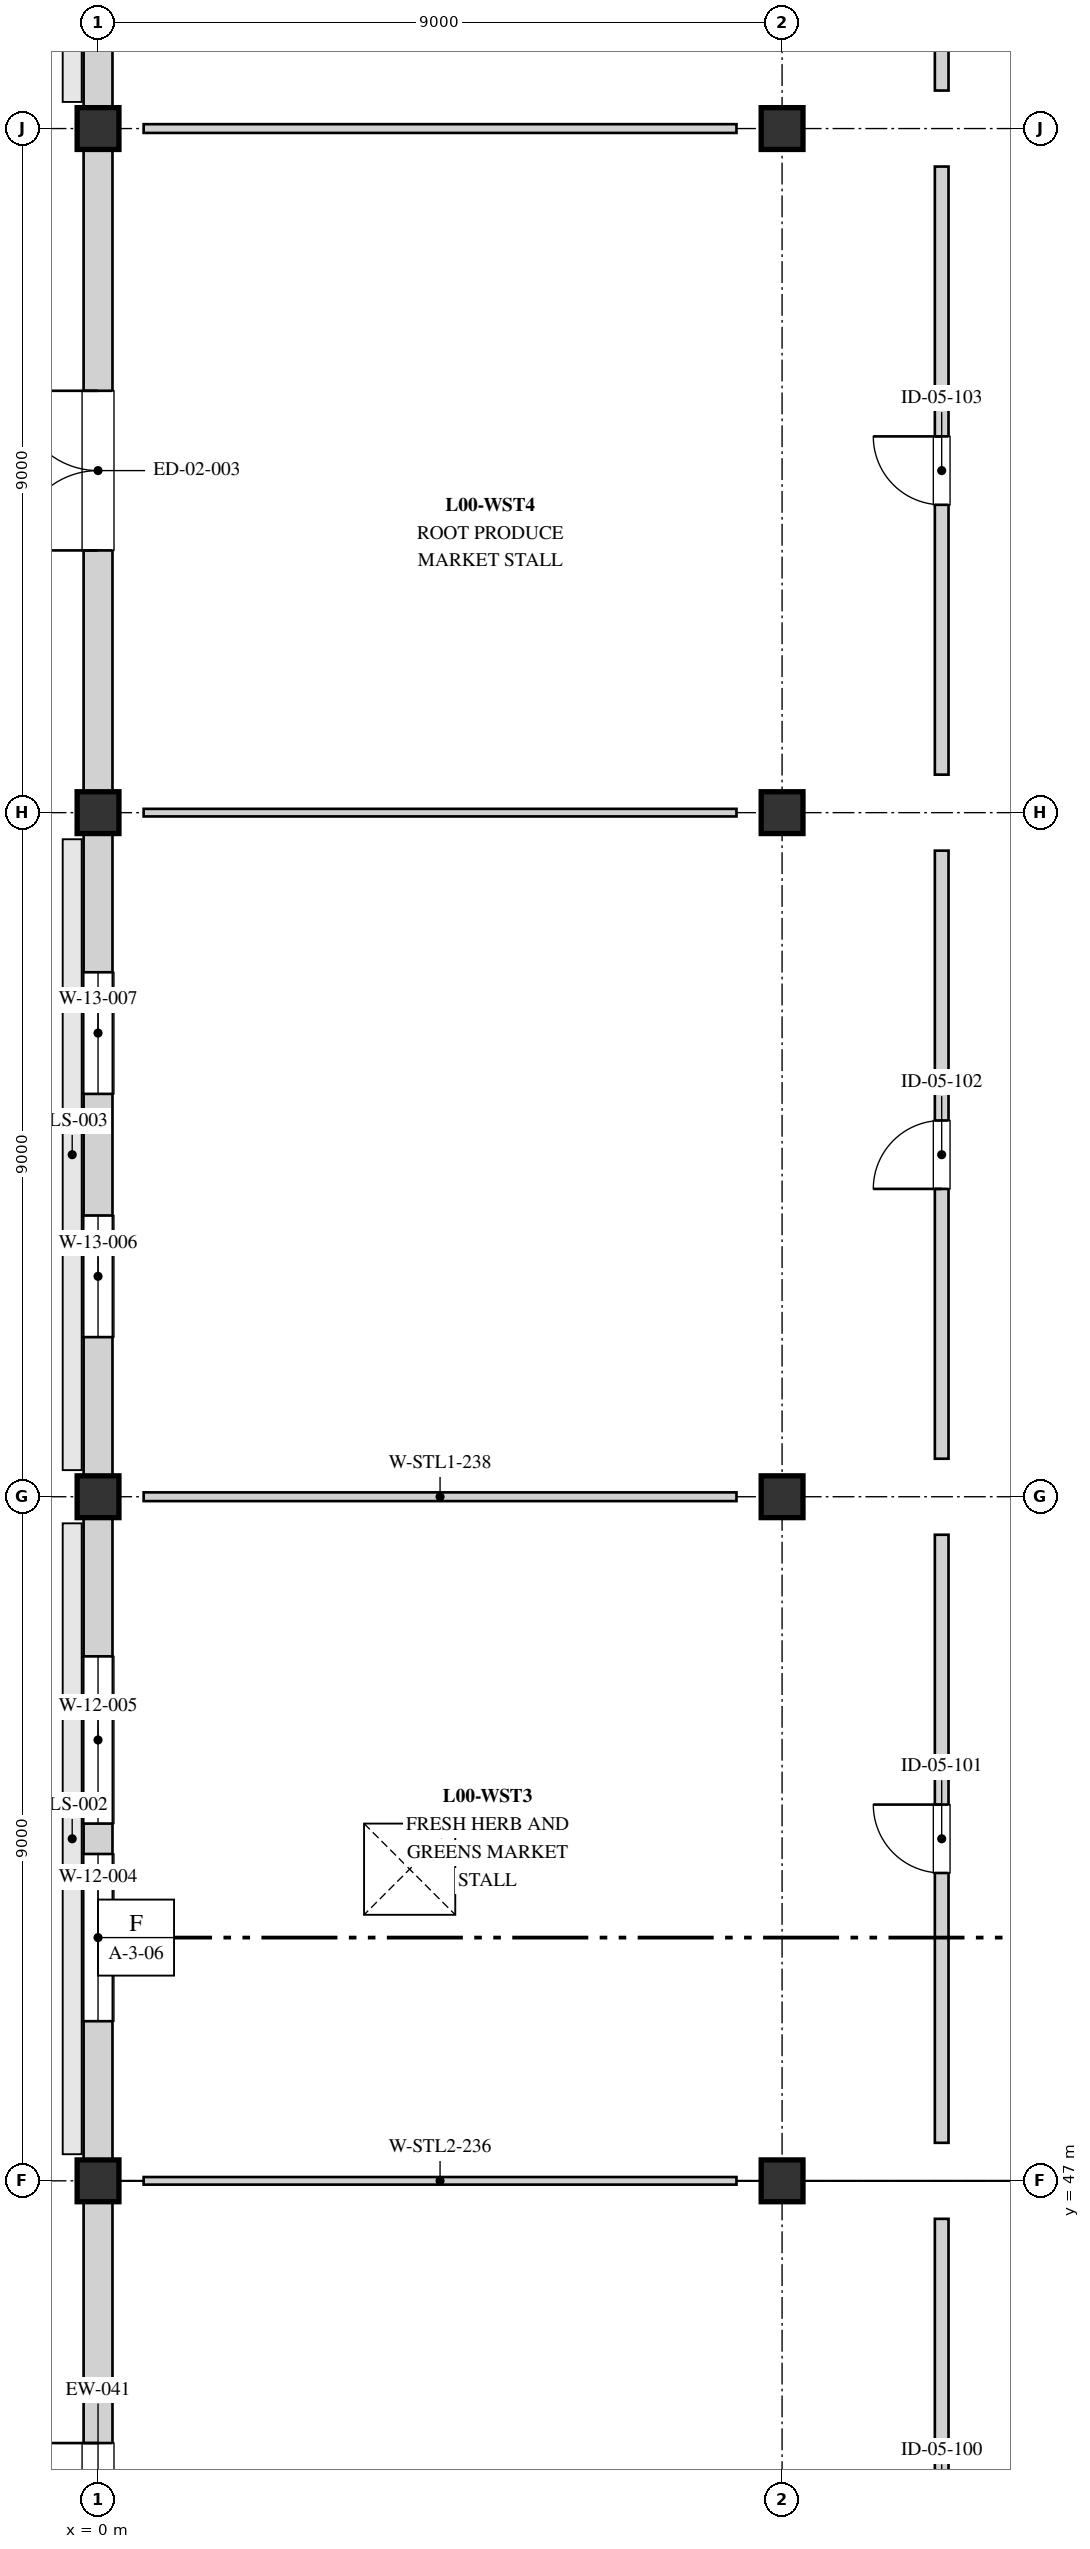
"""IFC4 building model, lengths in metres.
Left out: names, types, materials, properties, quantities, classifications, styles, units other than length and angle.
Written with IfcOpenShell. Run it as: python <this file> out.ifc"""

import sys

from ifc_helpers import new_model, si_unit, direction, frame, frame_2d, origin, origin_2d, place, context, subcontext, project, spatial, rectangle, extrude, element, fill, save


model = new_model("IFC4")
c1 = context("Model", 3, precision=1e-05, world=origin(), true_north=direction((0.0, 1.0)))
c2 = subcontext(c1, "Body", "Model", "MODEL_VIEW")
j1 = project(units=[si_unit("LENGTHUNIT", "METRE"), si_unit("PLANEANGLEUNIT", "RADIAN")], contexts=[c1])
p1 = place(None, origin())
s1 = spatial("IfcSite", under=j1, at=p1, CompositionType="ELEMENT")
p2 = place(p1, origin())
s2 = spatial("IfcBuilding", under=s1, at=p2, CompositionType="ELEMENT")
p3 = place(p2, origin())
s3 = spatial("IfcBuildingStorey", under=s2, at=p3, CompositionType="ELEMENT", Elevation=0.0)
for number, where, z_axis, x_axis in (
    (1, (0.0, 47.0, 0.0), (0.0, 0.0, 1.0), (1.0, 0.0, 0.0)),
    (2, (0.0, 56.0, 0.0), (0.0, 0.0, 1.0), (1.0, 0.0, 0.0)),
    (3, (0.0, 65.0, 0.0), (0.0, 0.0, 1.0), (1.0, 0.0, 0.0)),
    (4, (0.0, 74.0, 0.0), (0.0, 0.0, 1.0), (1.0, 0.0, 0.0)),
    (5, (9.0, 47.0, 0.0), (0.0, 0.0, 1.0), (1.0, 0.0, 0.0)),
    (6, (9.0, 56.0, 0.0), (0.0, 0.0, 1.0), (1.0, 0.0, 0.0)),
    (7, (9.0, 65.0, 0.0), (0.0, 0.0, 1.0), (1.0, 0.0, 0.0)),
    (8, (9.0, 74.0, 0.0), (0.0, 0.0, 1.0), (1.0, 0.0, 0.0)),
):
    element("IfcColumn", number, at=place(p3, frame(where, z_axis=z_axis, x_axis=x_axis)), inside=s3, PredefinedType="COLUMN", context=c2, shape_type="SweptSolid", body=[
        extrude(rectangle(XDim=0.55, YDim=0.55, at=origin_2d()), origin(), (0.0, 0.0, 1.0), 4.5),
    ])
p4 = place(p3, frame((0.0, 38.0, 0.0), z_axis=(0.0, 0.0, 1.0), x_axis=(0.0, 1.0, 0.0)))
e9 = element("IfcWall", 9, at=p4, inside=s3, PredefinedType="STANDARD", context=c2, shape_type="SweptSolid", body=[
    extrude(rectangle(XDim=9.0, YDim=0.38, at=frame_2d((4.5, 0.0))), origin(), (0.0, 0.0, 1.0), 3.35),
])
p5 = place(p4, frame((3.45, 0.0, 0.0)))
e10 = element("IfcOpeningElement", 10, at=p5, cuts=e9, PredefinedType="OPENING", context=c2, shape_type="SweptSolid", body=[
    extrude(rectangle(XDim=2.1, YDim=2.5, at=frame_2d((1.05, 1.25))), frame((0.0, 0.2, 0.0), z_axis=(0.0, -1.0, 0.0), x_axis=(1.0, 0.0, 0.0)), (0.0, 0.0, 1.0), 0.4),
])
p6 = place(p3, frame((0.0, 47.0, 0.0), z_axis=(0.0, 0.0, 1.0), x_axis=(0.0, 1.0, 0.0)))
e11 = element("IfcWall", 11, at=p6, inside=s3, PredefinedType="STANDARD", context=c2, shape_type="SweptSolid", body=[
    extrude(rectangle(XDim=9.0, YDim=0.38, at=frame_2d((4.5, 0.0))), origin(), (0.0, 0.0, 1.0), 3.35),
])
p7 = place(p6, frame((2.1, 0.0, 0.95)))
e12 = element("IfcOpeningElement", 12, at=p7, cuts=e11, PredefinedType="OPENING", context=c2, shape_type="SweptSolid", body=[
    extrude(rectangle(XDim=2.2, YDim=2.1, at=frame_2d((1.1, 1.05))), frame((0.0, 0.2, 0.0), z_axis=(0.0, -1.0, 0.0), x_axis=(1.0, 0.0, 0.0)), (0.0, 0.0, 1.0), 0.4),
])
p8 = place(p6, frame((4.7, 0.0, 0.95)))
e13 = element("IfcOpeningElement", 13, at=p8, cuts=e11, PredefinedType="OPENING", context=c2, shape_type="SweptSolid", body=[
    extrude(rectangle(XDim=2.2, YDim=2.1, at=frame_2d((1.1, 1.05))), frame((0.0, 0.2, 0.0), z_axis=(0.0, -1.0, 0.0), x_axis=(1.0, 0.0, 0.0)), (0.0, 0.0, 1.0), 0.4),
])
p9 = place(p3, frame((0.0, 56.0, 0.0), z_axis=(0.0, 0.0, 1.0), x_axis=(0.0, 1.0, 0.0)))
e14 = element("IfcWall", 14, at=p9, inside=s3, PredefinedType="STANDARD", context=c2, shape_type="SweptSolid", body=[
    extrude(rectangle(XDim=9.0, YDim=0.38, at=frame_2d((4.5, 0.0))), origin(), (0.0, 0.0, 1.0), 3.35),
])
p10 = place(p9, frame((2.1, 0.0, 0.95)))
e15 = element("IfcOpeningElement", 15, at=p10, cuts=e14, PredefinedType="OPENING", context=c2, shape_type="SweptSolid", body=[
    extrude(rectangle(XDim=1.6, YDim=2.1, at=frame_2d((0.8, 1.05))), frame((0.0, 0.2, 0.0), z_axis=(0.0, -1.0, 0.0), x_axis=(1.0, 0.0, 0.0)), (0.0, 0.0, 1.0), 0.4),
])
p11 = place(p9, frame((5.3, 0.0, 0.95)))
e16 = element("IfcOpeningElement", 16, at=p11, cuts=e14, PredefinedType="OPENING", context=c2, shape_type="SweptSolid", body=[
    extrude(rectangle(XDim=1.6, YDim=2.1, at=frame_2d((0.8, 1.05))), frame((0.0, 0.2, 0.0), z_axis=(0.0, -1.0, 0.0), x_axis=(1.0, 0.0, 0.0)), (0.0, 0.0, 1.0), 0.4),
])
p12 = place(p3, frame((0.0, 65.0, 0.0), z_axis=(0.0, 0.0, 1.0), x_axis=(0.0, 1.0, 0.0)))
e17 = element("IfcWall", 17, at=p12, inside=s3, PredefinedType="STANDARD", context=c2, shape_type="SweptSolid", body=[
    extrude(rectangle(XDim=9.0, YDim=0.38, at=frame_2d((4.5, 0.0))), origin(), (0.0, 0.0, 1.0), 3.35),
])
p13 = place(p12, frame((3.45, 0.0, 0.0)))
e18 = element("IfcOpeningElement", 18, at=p13, cuts=e17, PredefinedType="OPENING", context=c2, shape_type="SweptSolid", body=[
    extrude(rectangle(XDim=2.1, YDim=2.5, at=frame_2d((1.05, 1.25))), frame((0.0, 0.2, 0.0), z_axis=(0.0, -1.0, 0.0), x_axis=(1.0, 0.0, 0.0)), (0.0, 0.0, 1.0), 0.4),
])
p14 = place(p3, frame((0.0, 74.0, 0.0), z_axis=(0.0, 0.0, 1.0), x_axis=(0.0, 1.0, 0.0)))
e19 = element("IfcWall", 19, at=p14, inside=s3, PredefinedType="STANDARD", context=c2, shape_type="SweptSolid", body=[
    extrude(rectangle(XDim=9.0, YDim=0.38, at=frame_2d((4.5, 0.0))), origin(), (0.0, 0.0, 1.0), 3.35),
])
p15 = place(p14, frame((2.1, 0.0, 0.95)))
e20 = element("IfcOpeningElement", 20, at=p15, cuts=e19, PredefinedType="OPENING", context=c2, shape_type="SweptSolid", body=[
    extrude(rectangle(XDim=2.2, YDim=2.1, at=frame_2d((1.1, 1.05))), frame((0.0, 0.2, 0.0), z_axis=(0.0, -1.0, 0.0), x_axis=(1.0, 0.0, 0.0)), (0.0, 0.0, 1.0), 0.4),
])
p16 = place(p14, frame((4.7, 0.0, 0.95)))
e21 = element("IfcOpeningElement", 21, at=p16, cuts=e19, PredefinedType="OPENING", context=c2, shape_type="SweptSolid", body=[
    extrude(rectangle(XDim=2.2, YDim=2.1, at=frame_2d((1.1, 1.05))), frame((0.0, 0.2, 0.0), z_axis=(0.0, -1.0, 0.0), x_axis=(1.0, 0.0, 0.0)), (0.0, 0.0, 1.0), 0.4),
])
p17 = place(p3, frame((11.1, 38.5, 0.0), z_axis=(0.0, 0.0, 1.0), x_axis=(0.0, 1.0, 0.0)))
e22 = element("IfcWall", 22, at=p17, inside=s3, PredefinedType="STANDARD", context=c2, shape_type="SweptSolid", body=[
    extrude(rectangle(XDim=8.0, YDim=0.18, at=frame_2d((4.0, 0.0))), origin(), (0.0, 0.0, 1.0), 3.2),
])
p18 = place(p17, frame((3.55, 0.0, 0.0)))
e23 = element("IfcOpeningElement", 23, at=p18, cuts=e22, PredefinedType="OPENING", context=c2, shape_type="SweptSolid", body=[
    extrude(rectangle(XDim=0.9, YDim=2.05, at=frame_2d((0.45, 1.025))), frame((0.0, 0.1, 0.0), z_axis=(0.0, -1.0, 0.0), x_axis=(1.0, 0.0, 0.0)), (0.0, 0.0, 1.0), 0.2),
])
p19 = place(p3, frame((11.1, 47.5, 0.0), z_axis=(0.0, 0.0, 1.0), x_axis=(0.0, 1.0, 0.0)))
e24 = element("IfcWall", 24, at=p19, inside=s3, PredefinedType="STANDARD", context=c2, shape_type="SweptSolid", body=[
    extrude(rectangle(XDim=8.0, YDim=0.18, at=frame_2d((4.0, 0.0))), origin(), (0.0, 0.0, 1.0), 3.2),
])
p20 = place(p19, frame((3.55, 0.0, 0.0)))
e25 = element("IfcOpeningElement", 25, at=p20, cuts=e24, PredefinedType="OPENING", context=c2, shape_type="SweptSolid", body=[
    extrude(rectangle(XDim=0.9, YDim=2.05, at=frame_2d((0.45, 1.025))), frame((0.0, 0.1, 0.0), z_axis=(0.0, -1.0, 0.0), x_axis=(1.0, 0.0, 0.0)), (0.0, 0.0, 1.0), 0.2),
])
p21 = place(p3, frame((11.1, 56.5, 0.0), z_axis=(0.0, 0.0, 1.0), x_axis=(0.0, 1.0, 0.0)))
e26 = element("IfcWall", 26, at=p21, inside=s3, PredefinedType="STANDARD", context=c2, shape_type="SweptSolid", body=[
    extrude(rectangle(XDim=8.0, YDim=0.18, at=frame_2d((4.0, 0.0))), origin(), (0.0, 0.0, 1.0), 3.2),
])
p22 = place(p21, frame((3.55, 0.0, 0.0)))
e27 = element("IfcOpeningElement", 27, at=p22, cuts=e26, PredefinedType="OPENING", context=c2, shape_type="SweptSolid", body=[
    extrude(rectangle(XDim=0.9, YDim=2.05, at=frame_2d((0.45, 1.025))), frame((0.0, 0.1, 0.0), z_axis=(0.0, -1.0, 0.0), x_axis=(1.0, 0.0, 0.0)), (0.0, 0.0, 1.0), 0.2),
])
p23 = place(p3, frame((11.1, 65.5, 0.0), z_axis=(0.0, 0.0, 1.0), x_axis=(0.0, 1.0, 0.0)))
e28 = element("IfcWall", 28, at=p23, inside=s3, PredefinedType="STANDARD", context=c2, shape_type="SweptSolid", body=[
    extrude(rectangle(XDim=8.0, YDim=0.18, at=frame_2d((4.0, 0.0))), origin(), (0.0, 0.0, 1.0), 3.2),
])
p24 = place(p23, frame((3.55, 0.0, 0.0)))
e29 = element("IfcOpeningElement", 29, at=p24, cuts=e28, PredefinedType="OPENING", context=c2, shape_type="SweptSolid", body=[
    extrude(rectangle(XDim=0.9, YDim=2.05, at=frame_2d((0.45, 1.025))), frame((0.0, 0.1, 0.0), z_axis=(0.0, -1.0, 0.0), x_axis=(1.0, 0.0, 0.0)), (0.0, 0.0, 1.0), 0.2),
])
p25 = place(p3, frame((11.1, 74.5, 0.0), z_axis=(0.0, 0.0, 1.0), x_axis=(0.0, 1.0, 0.0)))
e30 = element("IfcWall", 30, at=p25, inside=s3, PredefinedType="STANDARD", context=c2, shape_type="SweptSolid", body=[
    extrude(rectangle(XDim=8.0, YDim=0.18, at=frame_2d((4.0, 0.0))), origin(), (0.0, 0.0, 1.0), 3.2),
])
p26 = place(p25, frame((3.55, 0.0, 0.0)))
e31 = element("IfcOpeningElement", 31, at=p26, cuts=e30, PredefinedType="OPENING", context=c2, shape_type="SweptSolid", body=[
    extrude(rectangle(XDim=0.9, YDim=2.05, at=frame_2d((0.45, 1.025))), frame((0.0, 0.1, 0.0), z_axis=(0.0, -1.0, 0.0), x_axis=(1.0, 0.0, 0.0)), (0.0, 0.0, 1.0), 0.2),
])
p27 = place(p3, frame((0.6, 47.0, 0.0), z_axis=(0.0, 0.0, 1.0), x_axis=(1.0, 0.0, 0.0)))
e32 = element("IfcWall", 32, at=p27, inside=s3, PredefinedType="PARTITIONING", context=c2, shape_type="SweptSolid", body=[
    extrude(rectangle(XDim=7.8, YDim=0.1, at=frame_2d((3.9, 0.0))), origin(), (0.0, 0.0, 1.0), 2.4),
])
p28 = place(p3, frame((0.6, 56.0, 0.0), z_axis=(0.0, 0.0, 1.0), x_axis=(1.0, 0.0, 0.0)))
e33 = element("IfcWall", 33, at=p28, inside=s3, PredefinedType="PARTITIONING", context=c2, shape_type="SweptSolid", body=[
    extrude(rectangle(XDim=7.8, YDim=0.115, at=frame_2d((3.9, 0.0))), origin(), (0.0, 0.0, 1.0), 2.4),
])
p29 = place(p3, frame((0.6, 65.0, 0.0), z_axis=(0.0, 0.0, 1.0), x_axis=(1.0, 0.0, 0.0)))
e34 = element("IfcWall", 34, at=p29, inside=s3, PredefinedType="PARTITIONING", context=c2, shape_type="SweptSolid", body=[
    extrude(rectangle(XDim=7.8, YDim=0.1, at=frame_2d((3.9, 0.0))), origin(), (0.0, 0.0, 1.0), 2.4),
])
p30 = place(p3, frame((0.6, 74.0, 0.0), z_axis=(0.0, 0.0, 1.0), x_axis=(1.0, 0.0, 0.0)))
e35 = element("IfcWall", 35, at=p30, inside=s3, PredefinedType="PARTITIONING", context=c2, shape_type="SweptSolid", body=[
    extrude(rectangle(XDim=7.8, YDim=0.115, at=frame_2d((3.9, 0.0))), origin(), (0.0, 0.0, 1.0), 2.4),
])
p31 = place(p5, origin())
e36 = element("IfcDoor", 36, at=p31, inside=s3, OperationType="DOUBLE_DOOR_SINGLE_SWING", PredefinedType="DOOR", context=c2, shape_type="SweptSolid", body=[
    extrude(rectangle(XDim=2.1, YDim=2.5, at=frame_2d((1.05, 1.25))), frame((0.0, 0.025, 0.0), z_axis=(0.0, -1.0, 0.0), x_axis=(1.0, 0.0, 0.0)), (0.0, 0.0, 1.0), 0.05),
])
fill(e10, e36)
p32 = place(p7, origin())
e37 = element("IfcWindow", 37, at=p32, inside=s3, PartitioningType="SINGLE_PANEL", PredefinedType="WINDOW", context=c2, shape_type="SweptSolid", body=[
    extrude(rectangle(XDim=2.2, YDim=2.1, at=frame_2d((1.1, 1.05))), frame((0.0, 0.03, 0.0), z_axis=(0.0, -1.0, 0.0), x_axis=(1.0, 0.0, 0.0)), (0.0, 0.0, 1.0), 0.06),
])
fill(e12, e37)
p33 = place(p8, origin())
e38 = element("IfcWindow", 38, at=p33, inside=s3, PartitioningType="SINGLE_PANEL", PredefinedType="WINDOW", context=c2, shape_type="SweptSolid", body=[
    extrude(rectangle(XDim=2.2, YDim=2.1, at=frame_2d((1.1, 1.05))), frame((0.0, 0.03, 0.0), z_axis=(0.0, -1.0, 0.0), x_axis=(1.0, 0.0, 0.0)), (0.0, 0.0, 1.0), 0.06),
])
fill(e13, e38)
p34 = place(p10, origin())
e39 = element("IfcWindow", 39, at=p34, inside=s3, PartitioningType="SINGLE_PANEL", PredefinedType="WINDOW", context=c2, shape_type="SweptSolid", body=[
    extrude(rectangle(XDim=1.6, YDim=2.1, at=frame_2d((0.8, 1.05))), frame((0.0, 0.03, 0.0), z_axis=(0.0, -1.0, 0.0), x_axis=(1.0, 0.0, 0.0)), (0.0, 0.0, 1.0), 0.06),
])
fill(e15, e39)
p35 = place(p11, origin())
e40 = element("IfcWindow", 40, at=p35, inside=s3, PartitioningType="SINGLE_PANEL", PredefinedType="WINDOW", context=c2, shape_type="SweptSolid", body=[
    extrude(rectangle(XDim=1.6, YDim=2.1, at=frame_2d((0.8, 1.05))), frame((0.0, 0.03, 0.0), z_axis=(0.0, -1.0, 0.0), x_axis=(1.0, 0.0, 0.0)), (0.0, 0.0, 1.0), 0.06),
])
fill(e16, e40)
p36 = place(p13, origin())
e41 = element("IfcDoor", 41, at=p36, inside=s3, OperationType="DOUBLE_DOOR_SINGLE_SWING", PredefinedType="DOOR", context=c2, shape_type="SweptSolid", body=[
    extrude(rectangle(XDim=2.1, YDim=2.5, at=frame_2d((1.05, 1.25))), frame((0.0, 0.025, 0.0), z_axis=(0.0, -1.0, 0.0), x_axis=(1.0, 0.0, 0.0)), (0.0, 0.0, 1.0), 0.05),
])
fill(e18, e41)
p37 = place(p20, origin())
e42 = element("IfcDoor", 42, at=p37, inside=s3, OperationType="SINGLE_SWING_RIGHT", PredefinedType="DOOR", context=c2, shape_type="SweptSolid", body=[
    extrude(rectangle(XDim=0.9, YDim=2.05, at=frame_2d((0.45, 1.025))), frame((0.0, 0.025, 0.0), z_axis=(0.0, -1.0, 0.0), x_axis=(1.0, 0.0, 0.0)), (0.0, 0.0, 1.0), 0.05),
])
fill(e25, e42)
p38 = place(p22, origin())
e43 = element("IfcDoor", 43, at=p38, inside=s3, OperationType="SINGLE_SWING_LEFT", PredefinedType="DOOR", context=c2, shape_type="SweptSolid", body=[
    extrude(rectangle(XDim=0.9, YDim=2.05, at=frame_2d((0.45, 1.025))), frame((0.0, 0.025, 0.0), z_axis=(0.0, -1.0, 0.0), x_axis=(1.0, 0.0, 0.0)), (0.0, 0.0, 1.0), 0.05),
])
fill(e27, e43)
p39 = place(p24, origin())
e44 = element("IfcDoor", 44, at=p39, inside=s3, OperationType="SINGLE_SWING_RIGHT", PredefinedType="DOOR", context=c2, shape_type="SweptSolid", body=[
    extrude(rectangle(XDim=0.9, YDim=2.05, at=frame_2d((0.45, 1.025))), frame((0.0, 0.025, 0.0), z_axis=(0.0, -1.0, 0.0), x_axis=(1.0, 0.0, 0.0)), (0.0, 0.0, 1.0), 0.05),
])
fill(e29, e44)
save(model, sys.argv[1])
